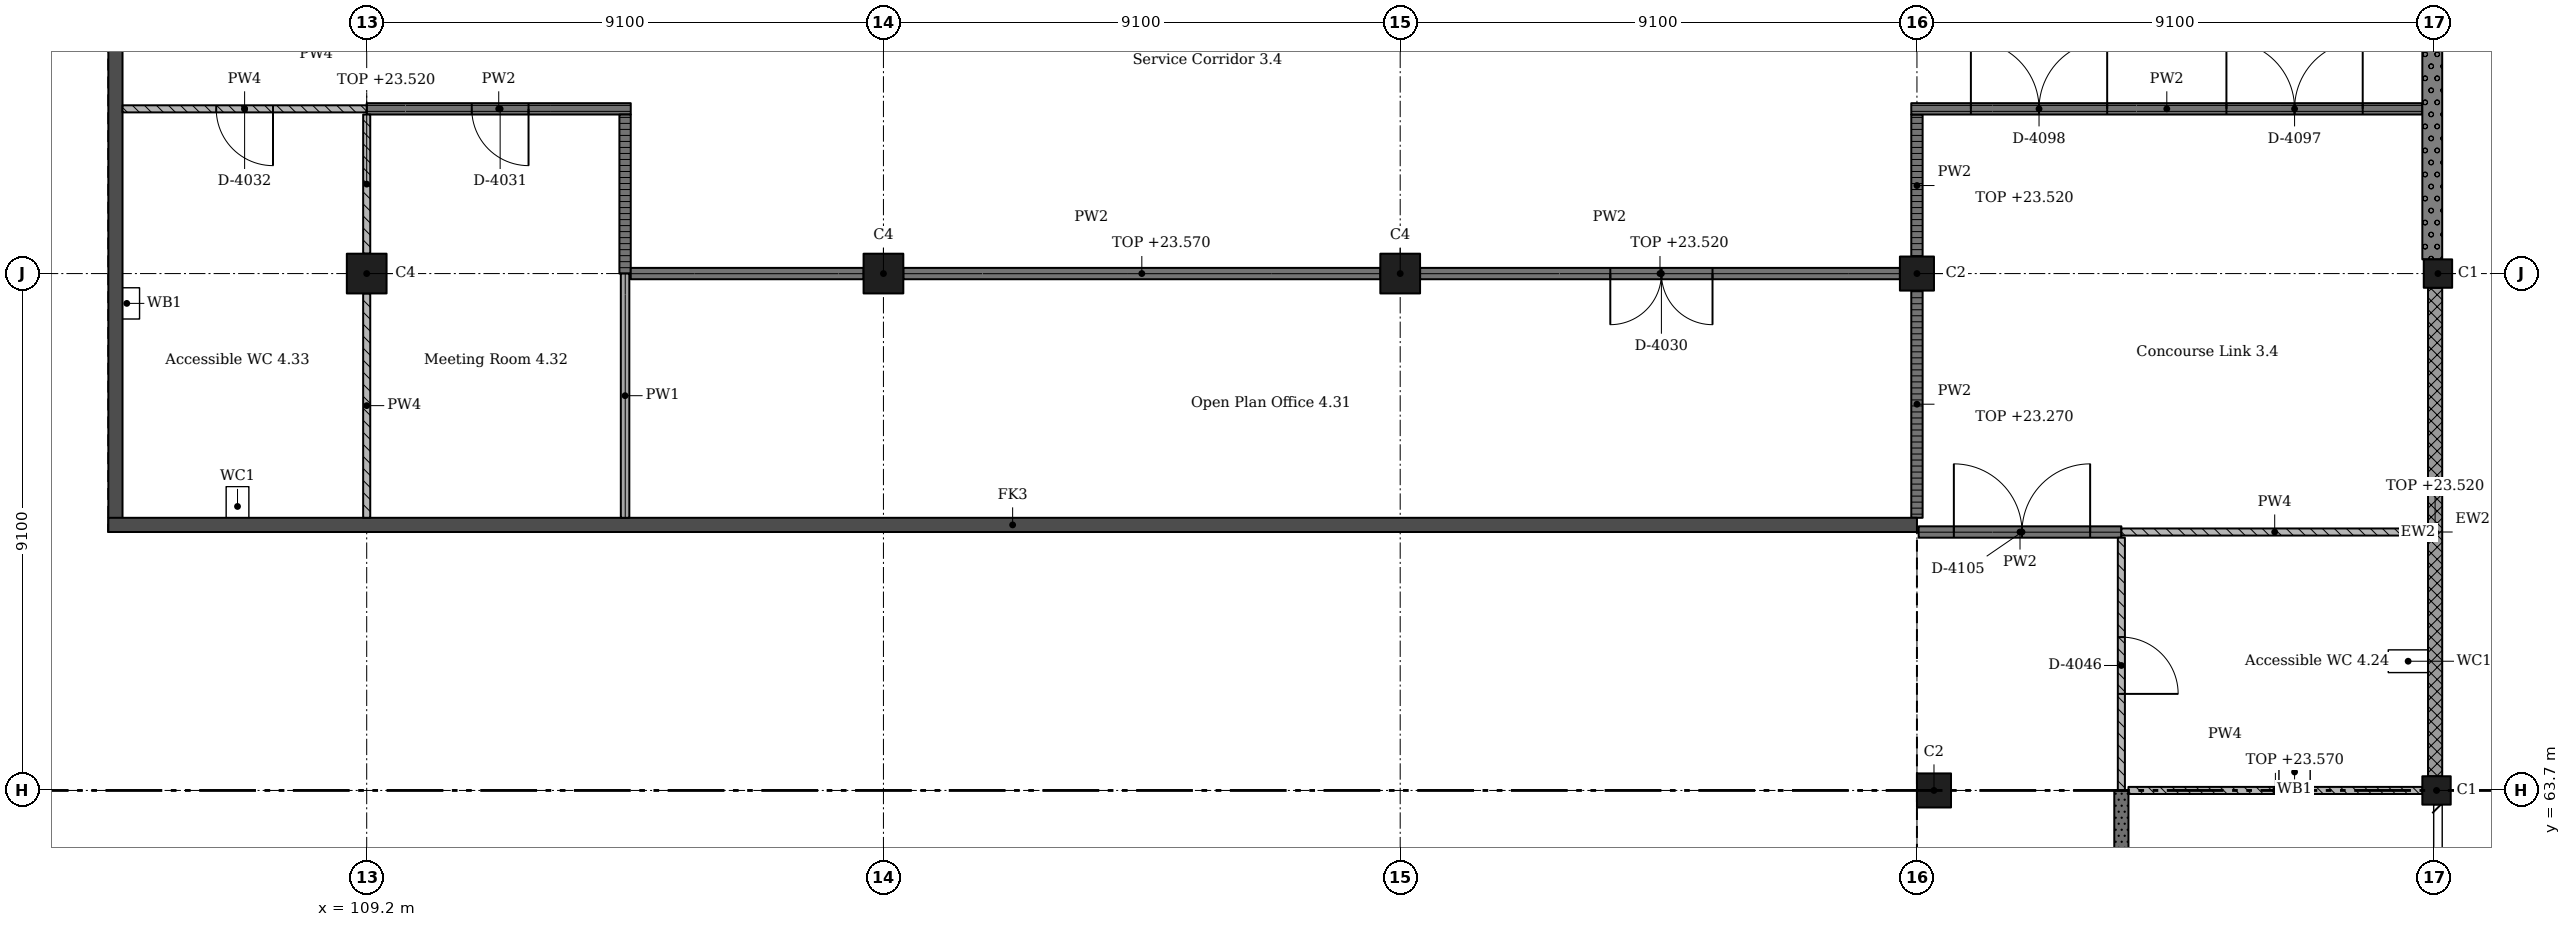
"""IFC4 building model, lengths in metres.
Left out: names, types, materials, properties, quantities, classifications, styles, units other than length and angle.
Written with IfcOpenShell. Run it as: python <this file> out.ifc"""

import sys

from ifc_helpers import new_model, si_unit, direction, frame, frame_2d, origin, origin_2d, place, context, subcontext, project, spatial, rectangle, extrude, element, fill, save


model = new_model("IFC4")
c1 = context("Model", 3, precision=1e-05, world=origin(), true_north=direction((0.0, 1.0)))
c2 = subcontext(c1, "Body", "Model", "MODEL_VIEW")
j1 = project(units=[si_unit("LENGTHUNIT", "METRE"), si_unit("PLANEANGLEUNIT", "RADIAN")], contexts=[c1])
p1 = place(None, origin())
s1 = spatial("IfcSite", under=j1, at=p1, CompositionType="ELEMENT")
p2 = place(p1, origin())
s2 = spatial("IfcBuilding", under=s1, at=p2, CompositionType="ELEMENT")
p3 = place(p2, frame((0.0, 0.0, 20.02)))
s3 = spatial("IfcBuildingStorey", under=s2, at=p3, CompositionType="ELEMENT", Elevation=20.02)
for number, where, z_axis, x_axis in (
    (1, (109.2, 72.8, 0.0), (0.0, 0.0, 1.0), (1.0, 0.0, 0.0)),
    (2, (118.3, 72.8, 0.0), (0.0, 0.0, 1.0), (1.0, 0.0, 0.0)),
    (3, (127.4, 72.8, 0.0), (0.0, 0.0, 1.0), (1.0, 0.0, 0.0)),
):
    element("IfcColumn", number, at=place(p3, frame(where, z_axis=z_axis, x_axis=x_axis)), inside=s3, PredefinedType="COLUMN", context=c2, shape_type="SweptSolid", body=[
        extrude(rectangle(XDim=0.7, YDim=0.7, at=origin_2d()), origin(), (0.0, 0.0, 1.0), 4.55),
    ])
for number, where, z_axis, x_axis in (
    (4, (136.8, 63.7, 0.0), (0.0, 0.0, 1.0), (1.0, 0.0, 0.0)),
    (5, (136.5, 72.8, 0.0), (0.0, 0.0, 1.0), (1.0, 0.0, 0.0)),
):
    element("IfcColumn", number, at=place(p3, frame(where, z_axis=z_axis, x_axis=x_axis)), inside=s3, PredefinedType="COLUMN", context=c2, shape_type="SweptSolid", body=[
        extrude(rectangle(XDim=0.6, YDim=0.6, at=origin_2d()), origin(), (0.0, 0.0, 1.0), 4.55),
    ])
for number, where, z_axis, x_axis in (
    (6, (145.65, 63.7, 0.0), (0.0, 0.0, 1.0), (1.0, 0.0, 0.0)),
    (7, (145.675, 72.8, 0.0), (0.0, 0.0, 1.0), (1.0, 0.0, 0.0)),
):
    element("IfcColumn", number, at=place(p3, frame(where, z_axis=z_axis, x_axis=x_axis)), inside=s3, PredefinedType="COLUMN", context=c2, shape_type="SweptSolid", body=[
        extrude(rectangle(XDim=0.5, YDim=0.5, at=origin_2d()), origin(), (0.0, 0.0, 1.0), 4.55),
    ])
for number, where, z_axis, x_axis in (
    (8, (104.775, 68.25, 0.0), (0.0, 0.0, 1.0), (0.0, 1.0, 0.0)),
    (9, (104.65, 68.375, 0.0), (0.0, 0.0, 1.0), (1.0, 0.0, 0.0)),
):
    element("IfcWall", number, at=place(p3, frame(where, z_axis=z_axis, x_axis=x_axis)), inside=s3, PredefinedType="SHEAR", context=c2, shape_type="SweptSolid", body=[
        extrude(rectangle(XDim=31.85, YDim=0.25, at=frame_2d((15.925, 0.0))), origin(), (0.0, 0.0, 1.0), 4.55),
    ])
p4 = place(p3, frame((145.625, 63.95, 0.0), z_axis=(0.0, 0.0, 1.0), x_axis=(0.0, 1.0, 0.0)))
e10 = element("IfcWall", 10, at=p4, inside=s3, PredefinedType="SOLIDWALL", context=c2, shape_type="SweptSolid", body=[
    extrude(rectangle(XDim=8.6, YDim=0.25, at=frame_2d((4.3, 0.0))), origin(), (0.0, 0.0, 1.0), 3.5),
])
p5 = place(p3, frame((145.575, 73.05, 0.0), z_axis=(0.0, 0.0, 1.0), x_axis=(0.0, 1.0, 0.0)))
e11 = element("IfcWall", 11, at=p5, inside=s3, PredefinedType="SOLIDWALL", context=c2, shape_type="SweptSolid", body=[
    extrude(rectangle(XDim=8.6, YDim=0.35, at=frame_2d((4.3, 0.0))), origin(), (0.0, 0.0, 1.0), 3.5),
])
p6 = place(p3, frame((104.9, 75.7, 0.0), z_axis=(0.0, 0.0, 1.0), x_axis=(1.0, 0.0, 0.0)))
e12 = element("IfcWall", 12, at=p6, inside=s3, PredefinedType="PARTITIONING", context=c2, shape_type="SweptSolid", body=[
    extrude(rectangle(XDim=4.3, YDim=0.125, at=frame_2d((2.15, 0.0))), origin(), (0.0, 0.0, 1.0), 4.25),
])
p7 = place(p6, frame((1.65, 0.0, 0.0)))
e13 = element("IfcOpeningElement", 13, at=p7, cuts=e12, PredefinedType="OPENING", context=c2, shape_type="SweptSolid", body=[
    extrude(rectangle(XDim=1.0, YDim=2.1, at=frame_2d((0.5, 1.05))), frame((0.0, 0.073, 0.0), z_axis=(0.0, -1.0, 0.0), x_axis=(1.0, 0.0, 0.0)), (0.0, 0.0, 1.0), 0.145),
])
p8 = place(p3, frame((109.2, 68.5, 0.0), z_axis=(0.0, 0.0, 1.0), x_axis=(0.0, 1.0, 0.0)))
e14 = element("IfcWall", 14, at=p8, inside=s3, PredefinedType="PARTITIONING", context=c2, shape_type="SweptSolid", body=[
    extrude(rectangle(XDim=3.95, YDim=0.125, at=frame_2d((1.975, 0.0))), origin(), (0.0, 0.0, 1.0), 4.25),
])
p9 = place(p3, frame((109.2, 73.15, 0.0), z_axis=(0.0, 0.0, 1.0), x_axis=(0.0, 1.0, 0.0)))
e15 = element("IfcWall", 15, at=p9, inside=s3, PredefinedType="PARTITIONING", context=c2, shape_type="SweptSolid", body=[
    extrude(rectangle(XDim=2.45, YDim=0.125, at=frame_2d((1.225, 0.0))), origin(), (0.0, 0.0, 1.0), 3.5),
])
p10 = place(p3, frame((109.2, 75.7, 0.0), z_axis=(0.0, 0.0, 1.0), x_axis=(1.0, 0.0, 0.0)))
e16 = element("IfcWall", 16, at=p10, inside=s3, PredefinedType="PARTITIONING", context=c2, shape_type="SweptSolid", body=[
    extrude(rectangle(XDim=4.65, YDim=0.2, at=frame_2d((2.325, 0.0))), origin(), (0.0, 0.0, 1.0), 4.25),
])
p11 = place(p10, frame((1.85, 0.0, 0.0)))
e17 = element("IfcOpeningElement", 17, at=p11, cuts=e16, PredefinedType="OPENING", context=c2, shape_type="SweptSolid", body=[
    extrude(rectangle(XDim=1.0, YDim=2.1, at=frame_2d((0.5, 1.05))), frame((0.0, 0.11, 0.0), z_axis=(0.0, -1.0, 0.0), x_axis=(1.0, 0.0, 0.0)), (0.0, 0.0, 1.0), 0.22),
])
p12 = place(p3, frame((113.75, 68.5, 0.0), z_axis=(0.0, 0.0, 1.0), x_axis=(0.0, 1.0, 0.0)))
e18 = element("IfcWall", 18, at=p12, inside=s3, PredefinedType="PARTITIONING", context=c2, shape_type="SweptSolid", body=[
    extrude(rectangle(XDim=4.3, YDim=0.15, at=frame_2d((2.15, 0.0))), origin(), (0.0, 0.0, 1.0), 4.25),
])
p13 = place(p3, frame((113.75, 75.6, 0.0), z_axis=(0.0, 0.0, 1.0), x_axis=(0.0, -1.0, 0.0)))
e19 = element("IfcWall", 19, at=p13, inside=s3, PredefinedType="PARTITIONING", context=c2, shape_type="SweptSolid", body=[
    extrude(rectangle(XDim=2.8, YDim=0.2, at=frame_2d((1.4, 0.0))), origin(), (0.0, 0.0, 1.0), 4.25),
])
p14 = place(p3, frame((113.85, 72.8, 0.0), z_axis=(0.0, 0.0, 1.0), x_axis=(1.0, 0.0, 0.0)))
e20 = element("IfcWall", 20, at=p14, inside=s3, PredefinedType="PARTITIONING", context=c2, shape_type="SweptSolid", body=[
    extrude(rectangle(XDim=4.1, YDim=0.2, at=frame_2d((2.05, 0.0))), origin(), (0.0, 0.0, 1.0), 3.55),
])
p15 = place(p3, frame((118.65, 72.8, 0.0), z_axis=(0.0, 0.0, 1.0), x_axis=(1.0, 0.0, 0.0)))
e21 = element("IfcWall", 21, at=p15, inside=s3, PredefinedType="PARTITIONING", context=c2, shape_type="SweptSolid", body=[
    extrude(rectangle(XDim=8.4, YDim=0.2, at=frame_2d((4.2, 0.0))), origin(), (0.0, 0.0, 1.0), 3.55),
])
p16 = place(p3, frame((127.75, 72.8, 0.0), z_axis=(0.0, 0.0, 1.0), x_axis=(1.0, 0.0, 0.0)))
e22 = element("IfcWall", 22, at=p16, inside=s3, PredefinedType="PARTITIONING", context=c2, shape_type="SweptSolid", body=[
    extrude(rectangle(XDim=8.45, YDim=0.2, at=frame_2d((4.225, 0.0))), origin(), (0.0, 0.0, 1.0), 3.5),
])
p17 = place(p16, frame((3.35, 0.0, 0.0)))
e23 = element("IfcOpeningElement", 23, at=p17, cuts=e22, PredefinedType="OPENING", context=c2, shape_type="SweptSolid", body=[
    extrude(rectangle(XDim=1.8, YDim=2.1, at=frame_2d((0.9, 1.05))), frame((0.0, 0.11, 0.0), z_axis=(0.0, -1.0, 0.0), x_axis=(1.0, 0.0, 0.0)), (0.0, 0.0, 1.0), 0.22),
])
p18 = place(p3, frame((136.5, 72.5, 0.0), z_axis=(0.0, 0.0, 1.0), x_axis=(0.0, -1.0, 0.0)))
e24 = element("IfcWall", 24, at=p18, inside=s3, PredefinedType="PARTITIONING", context=c2, shape_type="SweptSolid", body=[
    extrude(rectangle(XDim=4.0, YDim=0.2, at=frame_2d((2.0, 0.0))), origin(), (0.0, 0.0, 1.0), 3.25),
])
p19 = place(p3, frame((136.5, 75.6, 0.0), z_axis=(0.0, 0.0, 1.0), x_axis=(0.0, -1.0, 0.0)))
e25 = element("IfcWall", 25, at=p19, inside=s3, PredefinedType="PARTITIONING", context=c2, shape_type="SweptSolid", body=[
    extrude(rectangle(XDim=2.5, YDim=0.2, at=frame_2d((1.25, 0.0))), origin(), (0.0, 0.0, 1.0), 3.5),
])
p20 = place(p3, frame((140.1, 63.7, 0.0), z_axis=(0.0, 0.0, 1.0), x_axis=(0.0, -1.0, 0.0)))
e26 = element("IfcWall", 26, at=p20, inside=s3, PredefinedType="SOLIDWALL", context=c2, shape_type="SweptSolid", body=[
    extrude(rectangle(XDim=9.1, YDim=0.25, at=frame_2d((4.55, 0.0))), origin(), (0.0, 0.0, 1.0), 4.25),
])
p21 = place(p20, frame((4.05, 0.0, 0.0)))
e27 = element("IfcOpeningElement", 27, at=p21, cuts=e26, PredefinedType="OPENING", context=c2, shape_type="SweptSolid", body=[
    extrude(rectangle(XDim=1.0, YDim=2.1, at=frame_2d((0.5, 1.05))), frame((0.0, 0.135, 0.0), z_axis=(0.0, -1.0, 0.0), x_axis=(1.0, 0.0, 0.0)), (0.0, 0.0, 1.0), 0.27),
])
p22 = place(p3, frame((140.1, 68.15, 0.0), z_axis=(0.0, 0.0, 1.0), x_axis=(0.0, -1.0, 0.0)))
e28 = element("IfcWall", 28, at=p22, inside=s3, PredefinedType="PARTITIONING", context=c2, shape_type="SweptSolid", body=[
    extrude(rectangle(XDim=4.45, YDim=0.125, at=frame_2d((2.225, 0.0))), origin(), (0.0, 0.0, 1.0), 4.25),
])
p23 = place(p22, frame((1.75, 0.0, 0.0)))
e29 = element("IfcOpeningElement", 29, at=p23, cuts=e28, PredefinedType="OPENING", context=c2, shape_type="SweptSolid", body=[
    extrude(rectangle(XDim=1.0, YDim=2.1, at=frame_2d((0.5, 1.05))), frame((0.0, 0.073, 0.0), z_axis=(0.0, -1.0, 0.0), x_axis=(1.0, 0.0, 0.0)), (0.0, 0.0, 1.0), 0.145),
])
p24 = place(p3, frame((140.1, 68.25, 0.0), z_axis=(0.0, 0.0, 1.0), x_axis=(-1.0, 0.0, 0.0)))
e30 = element("IfcWall", 30, at=p24, inside=s3, PredefinedType="PARTITIONING", context=c2, shape_type="SweptSolid", body=[
    extrude(rectangle(XDim=3.57, YDim=0.2, at=frame_2d((1.785, 0.0))), origin(), (0.0, 0.0, 1.0), 4.25),
])
p25 = place(p24, frame((0.55, 0.0, 0.0)))
e31 = element("IfcOpeningElement", 31, at=p25, cuts=e30, PredefinedType="OPENING", context=c2, shape_type="SweptSolid", body=[
    extrude(rectangle(XDim=2.4, YDim=2.4, at=frame_2d((1.2, 1.2))), frame((0.0, 0.11, 0.0), z_axis=(0.0, -1.0, 0.0), x_axis=(1.0, 0.0, 0.0)), (0.0, 0.0, 1.0), 0.22),
])
p26 = place(p3, frame((140.225, 63.7, 0.0), z_axis=(0.0, 0.0, 1.0), x_axis=(1.0, 0.0, 0.0)))
e32 = element("IfcWall", 32, at=p26, inside=s3, PredefinedType="PARTITIONING", context=c2, shape_type="SweptSolid", body=[
    extrude(rectangle(XDim=5.175, YDim=0.125, at=frame_2d((2.587, 0.0))), origin(), (0.0, 0.0, 1.0), 3.55),
])
p27 = place(p3, frame((145.4, 75.7, 0.0), z_axis=(0.0, 0.0, 1.0), x_axis=(-1.0, 0.0, 0.0)))
e33 = element("IfcWall", 33, at=p27, inside=s3, PredefinedType="PARTITIONING", context=c2, shape_type="SweptSolid", body=[
    extrude(rectangle(XDim=9.0, YDim=0.2, at=frame_2d((4.5, 0.0))), origin(), (0.0, 0.0, 1.0), 4.25),
])
p28 = place(p27, frame((1.05, 0.0, 0.0)))
e34 = element("IfcOpeningElement", 34, at=p28, cuts=e33, PredefinedType="OPENING", context=c2, shape_type="SweptSolid", body=[
    extrude(rectangle(XDim=2.4, YDim=2.4, at=frame_2d((1.2, 1.2))), frame((0.0, 0.11, 0.0), z_axis=(0.0, -1.0, 0.0), x_axis=(1.0, 0.0, 0.0)), (0.0, 0.0, 1.0), 0.22),
])
p29 = place(p27, frame((5.55, 0.0, 0.0)))
e35 = element("IfcOpeningElement", 35, at=p29, cuts=e33, PredefinedType="OPENING", context=c2, shape_type="SweptSolid", body=[
    extrude(rectangle(XDim=2.4, YDim=2.4, at=frame_2d((1.2, 1.2))), frame((0.0, 0.11, 0.0), z_axis=(0.0, -1.0, 0.0), x_axis=(1.0, 0.0, 0.0)), (0.0, 0.0, 1.0), 0.22),
])
p30 = place(p3, frame((145.5, 68.25, 0.0), z_axis=(0.0, 0.0, 1.0), x_axis=(-1.0, 0.0, 0.0)))
e36 = element("IfcWall", 36, at=p30, inside=s3, PredefinedType="PARTITIONING", context=c2, shape_type="SweptSolid", body=[
    extrude(rectangle(XDim=5.4, YDim=0.125, at=frame_2d((2.7, 0.0))), origin(), (0.0, 0.0, 1.0), 4.25),
])
p31 = place(p17, origin())
e37 = element("IfcDoor", 37, at=p31, inside=s3, OperationType="DOUBLE_DOOR_SINGLE_SWING", PredefinedType="DOOR", context=c2, shape_type="SweptSolid", body=[
    extrude(rectangle(XDim=1.8, YDim=2.1, at=frame_2d((0.9, 1.05))), frame((0.0, 0.025, 0.0), z_axis=(0.0, -1.0, 0.0), x_axis=(1.0, 0.0, 0.0)), (0.0, 0.0, 1.0), 0.05),
])
fill(e23, e37)
p32 = place(p11, origin())
e38 = element("IfcDoor", 38, at=p32, inside=s3, OperationType="SINGLE_SWING_RIGHT", PredefinedType="DOOR", context=c2, shape_type="SweptSolid", body=[
    extrude(rectangle(XDim=1.0, YDim=2.1, at=frame_2d((0.5, 1.05))), frame((0.0, 0.025, 0.0), z_axis=(0.0, -1.0, 0.0), x_axis=(1.0, 0.0, 0.0)), (0.0, 0.0, 1.0), 0.05),
])
fill(e17, e38)
p33 = place(p7, origin())
e39 = element("IfcDoor", 39, at=p33, inside=s3, OperationType="SINGLE_SWING_RIGHT", PredefinedType="DOOR", context=c2, shape_type="SweptSolid", body=[
    extrude(rectangle(XDim=1.0, YDim=2.1, at=frame_2d((0.5, 1.05))), frame((0.0, 0.025, 0.0), z_axis=(0.0, -1.0, 0.0), x_axis=(1.0, 0.0, 0.0)), (0.0, 0.0, 1.0), 0.05),
])
fill(e13, e39)
p34 = place(p23, origin())
e40 = element("IfcDoor", 40, at=p34, inside=s3, OperationType="SINGLE_SWING_LEFT", PredefinedType="DOOR", context=c2, shape_type="SweptSolid", body=[
    extrude(rectangle(XDim=1.0, YDim=2.1, at=frame_2d((0.5, 1.05))), frame((0.0, 0.025, 0.0), z_axis=(0.0, -1.0, 0.0), x_axis=(1.0, 0.0, 0.0)), (0.0, 0.0, 1.0), 0.05),
])
fill(e29, e40)
p35 = place(p28, origin())
e41 = element("IfcDoor", 41, at=p35, inside=s3, OperationType="DOUBLE_DOOR_SINGLE_SWING", PredefinedType="DOOR", context=c2, shape_type="SweptSolid", body=[
    extrude(rectangle(XDim=2.4, YDim=2.4, at=frame_2d((1.2, 1.2))), frame((0.0, 0.025, 0.0), z_axis=(0.0, -1.0, 0.0), x_axis=(1.0, 0.0, 0.0)), (0.0, 0.0, 1.0), 0.05),
])
fill(e34, e41)
p36 = place(p29, origin())
e42 = element("IfcDoor", 42, at=p36, inside=s3, OperationType="DOUBLE_DOOR_SINGLE_SWING", PredefinedType="DOOR", context=c2, shape_type="SweptSolid", body=[
    extrude(rectangle(XDim=2.4, YDim=2.4, at=frame_2d((1.2, 1.2))), frame((0.0, 0.025, 0.0), z_axis=(0.0, -1.0, 0.0), x_axis=(1.0, 0.0, 0.0)), (0.0, 0.0, 1.0), 0.05),
])
fill(e35, e42)
p37 = place(p25, origin())
e43 = element("IfcDoor", 43, at=p37, inside=s3, OperationType="DOUBLE_DOOR_SINGLE_SWING", PredefinedType="DOOR", context=c2, shape_type="SweptSolid", body=[
    extrude(rectangle(XDim=2.4, YDim=2.4, at=frame_2d((1.2, 1.2))), frame((0.0, 0.025, 0.0), z_axis=(0.0, -1.0, 0.0), x_axis=(1.0, 0.0, 0.0)), (0.0, 0.0, 1.0), 0.05),
])
fill(e31, e43)
save(model, sys.argv[1])
